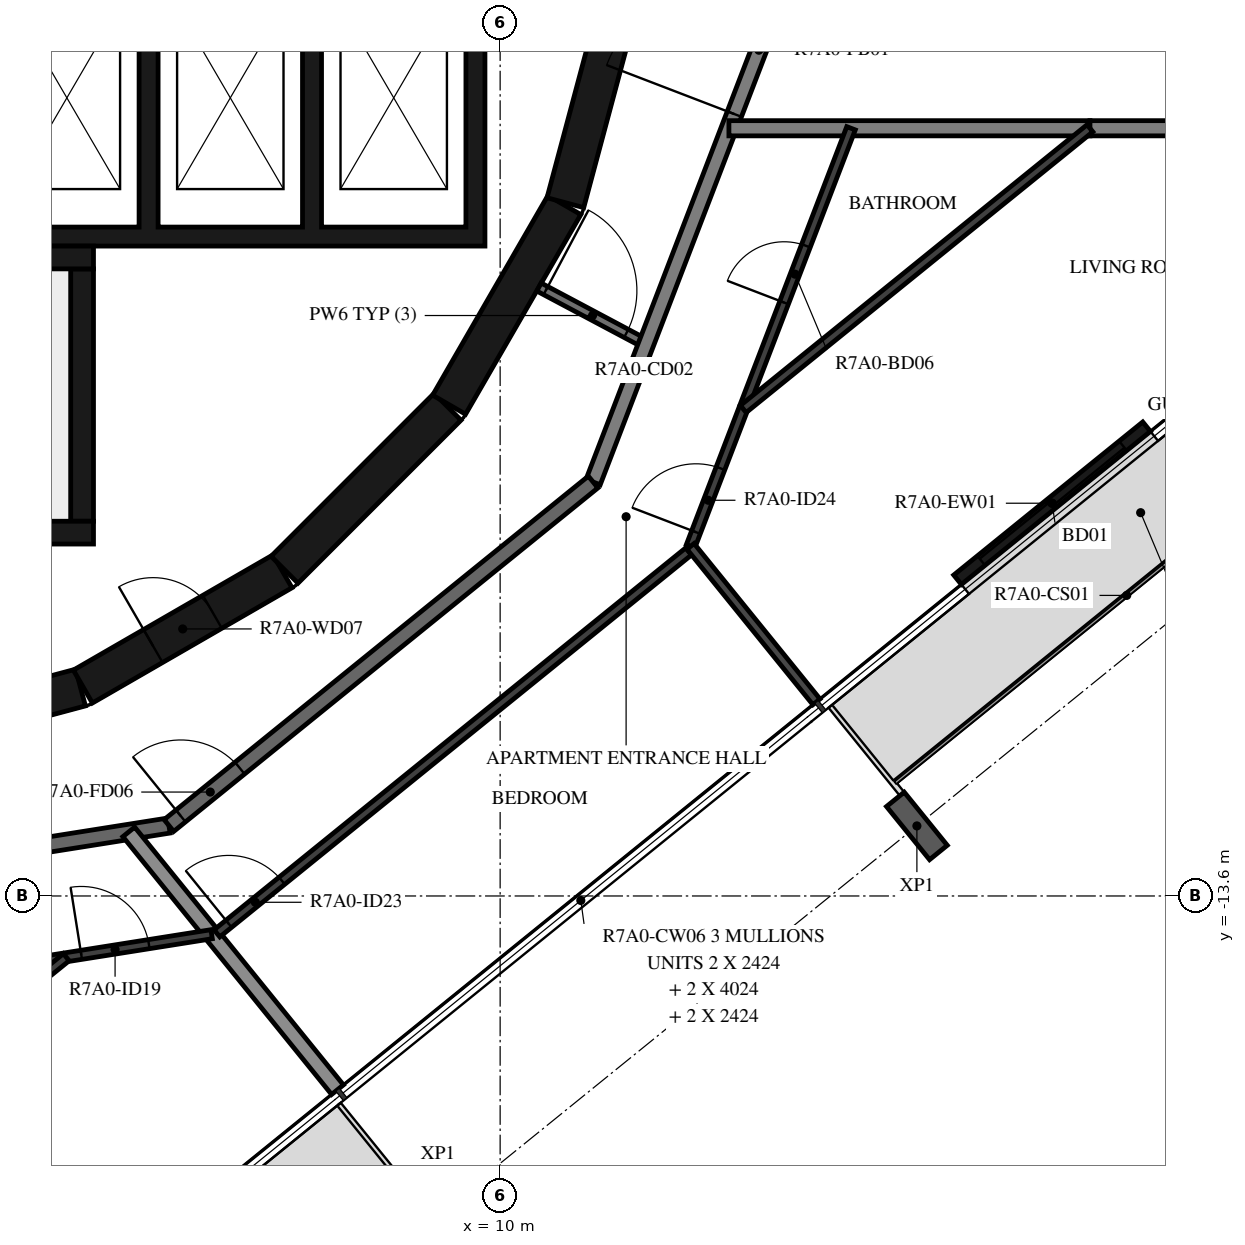
"""IFC4 building model, lengths in metres.
Left out: names, types, materials, properties, quantities, classifications, styles, units other than length and angle.
Written with IfcOpenShell. Run it as: python <this file> out.ifc"""

import sys

from ifc_helpers import new_model, si_unit, direction, frame, frame_2d, origin, origin_2d, place, context, subcontext, project, spatial, polyline, rectangle, i_section, outline, extrude, element, fill, save


model = new_model("IFC4")
c1 = context("Model", 3, precision=1e-05, world=origin(), true_north=direction((0.0, 1.0)))
c2 = subcontext(c1, "Body", "Model", "MODEL_VIEW")
j1 = project(units=[si_unit("LENGTHUNIT", "METRE"), si_unit("PLANEANGLEUNIT", "RADIAN")], contexts=[c1])
p1 = place(None, origin())
s1 = spatial("IfcSite", under=j1, at=p1, CompositionType="ELEMENT")
p2 = place(p1, origin())
s2 = spatial("IfcBuilding", under=s1, at=p2, CompositionType="ELEMENT")
p3 = place(p2, frame((0.0, 0.0, 270.4)))
s3 = spatial("IfcBuildingStorey", under=s2, at=p3, CompositionType="ELEMENT", Elevation=270.4)
p4 = place(p3, frame((15.483, -12.678, -0.38), z_axis=(0.0, 0.0, 1.0), x_axis=(-0.777146167973, -0.629320136024, 0.0)))
e1 = element("IfcColumn", 1, at=p4, inside=s3, PredefinedType="COLUMN", context=c2, shape_type="SweptSolid", body=[
    extrude(i_section(OverallWidth=0.3, OverallDepth=0.9, WebThickness=0.019, FlangeThickness=0.035, FilletRadius=0.03, at=origin_2d()), origin(), (0.0, 0.0, 1.0), 3.5),
])
p5 = place(p3, frame((16.018, -9.44, 0.0), z_axis=(0.0, 0.0, 1.0), x_axis=(0.777125818, 0.629345265333, 0.0)))
e2 = element("IfcWall", 2, at=p5, inside=s3, PredefinedType="STANDARD", context=c2, shape_type="SweptSolid", body=[
    extrude(rectangle(XDim=3.2, YDim=0.16, at=frame_2d((1.6, 0.0))), origin(), (0.0, 0.0, 1.0), 3.12),
])
p6 = place(p5, frame((0.4, 0.0, 0.0)))
e3 = element("IfcOpeningElement", 3, at=p6, cuts=e2, PredefinedType="OPENING", context=c2, shape_type="SweptSolid", body=[
    extrude(rectangle(XDim=2.4, YDim=2.4, at=frame_2d((1.2, 1.2))), frame((0.0, 0.09, 0.0), z_axis=(0.0, -1.0, 0.0), x_axis=(1.0, 0.0, 0.0)), (0.0, 0.0, 1.0), 0.18),
])
p7 = place(p3, frame((1.55, -11.643, 0.0), z_axis=(0.0, 0.0, 1.0), x_axis=(0.965948410781, 0.258734743916, 0.0)))
e4 = element("IfcWall", 4, at=p7, inside=s3, PredefinedType="SHEAR", context=c2, shape_type="SweptSolid", body=[
    extrude(rectangle(XDim=3.033, YDim=0.5, at=frame_2d((1.516, 0.0))), origin(), (0.0, 0.0, 1.0), 3.12),
])
p8 = place(p3, frame((4.51, -10.845, 0.0), z_axis=(0.0, 0.0, 1.0), x_axis=(0.865975092491, 0.500087131594, 0.0)))
e5 = element("IfcWall", 5, at=p8, inside=s3, PredefinedType="SHEAR", context=c2, shape_type="SweptSolid", body=[
    extrude(rectangle(XDim=3.033, YDim=0.5, at=frame_2d((1.516, 0.0))), origin(), (0.0, 0.0, 1.0), 3.12),
])
p9 = place(p8, frame((1.066, 0.0, 0.0)))
e6 = element("IfcOpeningElement", 6, at=p9, cuts=e5, PredefinedType="OPENING", context=c2, shape_type="SweptSolid", body=[
    extrude(rectangle(XDim=0.9, YDim=2.1, at=frame_2d((0.45, 1.05))), frame((0.0, 0.26, 0.0), z_axis=(0.0, -1.0, 0.0), x_axis=(1.0, 0.0, 0.0)), (0.0, 0.0, 1.0), 0.52),
])
p10 = place(p3, frame((7.164, -9.308, 0.0), z_axis=(0.0, 0.0, 1.0), x_axis=(0.707106781187, 0.707106781187, 0.0)))
e7 = element("IfcWall", 7, at=p10, inside=s3, PredefinedType="SHEAR", context=c2, shape_type="SweptSolid", body=[
    extrude(rectangle(XDim=3.032, YDim=0.5, at=frame_2d((1.516, 0.0))), origin(), (0.0, 0.0, 1.0), 3.12),
])
for number, where, z_axis, x_axis in (
    (8, (9.329, -7.137, 0.0), (0.0, 0.0, 1.0), (0.5, 0.866, 0.0)),
    (9, (10.858, -4.479, 0.0), (0.0, 0.0, 1.0), (0.259, 0.966, 0.0)),
):
    element("IfcWall", number, at=place(p3, frame(where, z_axis=z_axis, x_axis=x_axis)), inside=s3, PredefinedType="SHEAR", context=c2, shape_type="SweptSolid", body=[
        extrude(rectangle(XDim=3.033, YDim=0.5, at=frame_2d((1.516, 0.0))), origin(), (0.0, 0.0, 1.0), 3.12),
    ])
p11 = place(p3, frame((-2.4, -5.2, 0.0), z_axis=(0.0, 0.0, 1.0), x_axis=(1.0, 0.0, 0.0)))
e10 = element("IfcWall", 10, at=p11, inside=s3, PredefinedType="SHEAR", context=c2, shape_type="SweptSolid", body=[
    extrude(rectangle(XDim=7.05, YDim=0.3, at=frame_2d((3.525, 0.0))), origin(), (0.0, 0.0, 1.0), 3.12),
])
p12 = place(p3, frame((4.5, -8.67, 0.0), z_axis=(0.0, 0.0, 1.0), x_axis=(0.0, 1.0, 0.0)))
e11 = element("IfcWall", 11, at=p12, inside=s3, PredefinedType="SHEAR", context=c2, shape_type="SweptSolid", body=[
    extrude(rectangle(XDim=3.32, YDim=0.3, at=frame_2d((1.66, 0.0))), origin(), (0.0, 0.0, 1.0), 3.12),
])
p13 = place(p3, frame((0.1, -8.82, 0.0), z_axis=(0.0, 0.0, 1.0), x_axis=(1.0, 0.0, 0.0)))
e12 = element("IfcWall", 12, at=p13, inside=s3, PredefinedType="SHEAR", context=c2, shape_type="SweptSolid", body=[
    extrude(rectangle(XDim=4.55, YDim=0.3, at=frame_2d((2.275, 0.0))), origin(), (0.0, 0.0, 1.0), 3.12),
])
p14 = place(p3, origin())
e13 = element("IfcWall", 13, at=p14, inside=s3, PredefinedType="SHEAR", context=c2, shape_type="SweptSolid", body=[
    extrude(outline(polyline([(9.8, -5.05), (9.8, -4.8), (9.8, -1.9), (9.55, -1.9), (9.55, -4.8), (7.65, -4.8), (7.65, -1.9), (7.4, -1.9), (7.4, -4.8), (5.5, -4.8), (5.5, -1.9), (5.25, -1.9), (5.25, -4.8), (3.35, -4.8), (3.35, -1.9), (3.1, -1.9), (3.1, -4.8), (1.2, -4.8), (1.2, -1.9), (0.95, -1.9), (0.95, -4.8), (-0.95, -4.8), (-0.95, -1.9), (-1.2, -1.9), (-1.2, -4.8), (-3.1, -4.8), (-3.1, -1.9), (-3.35, -1.9), (-3.35, -4.8), (-5.25, -4.8), (-5.25, -1.9), (-5.5, -1.9), (-5.5, -4.8), (-7.4, -4.8), (-7.4, -1.9), (-7.65, -1.9), (-7.65, -4.8), (-9.55, -4.8), (-9.55, -1.9), (-9.8, -1.9), (-9.8, -4.8), (-9.8, -5.05), (9.8, -5.05)])), origin(), (0.0, 0.0, 1.0), 3.12),
])
p15 = place(p3, frame((10.511, -5.589, 0.0), z_axis=(0.0, 0.0, 1.0), x_axis=(0.882983002821, -0.469404960273, 0.0)))
e14 = element("IfcWall", 14, at=p15, inside=s3, PredefinedType="PARTITIONING", context=c2, shape_type="SweptSolid", body=[
    extrude(rectangle(XDim=1.596, YDim=0.12, at=frame_2d((0.798, 0.0))), origin(), (0.0, 0.0, 1.0), 3.12),
])
p16 = place(p15, frame((0.1, 0.0, 0.0)))
e15 = element("IfcOpeningElement", 15, at=p16, cuts=e14, PredefinedType="OPENING", context=c2, shape_type="SweptSolid", body=[
    extrude(rectangle(XDim=1.2, YDim=2.1, at=frame_2d((0.6, 1.05))), frame((0.0, 0.07, 0.0), z_axis=(0.0, -1.0, 0.0), x_axis=(1.0, 0.0, 0.0)), (0.0, 0.0, 1.0), 0.14),
])
p17 = place(p3, frame((11.223, -8.154, 0.0), z_axis=(0.0, 0.0, 1.0), x_axis=(0.358341090983, 0.93359073609, 0.0)))
e16 = element("IfcWall", 16, at=p17, inside=s3, PredefinedType="STANDARD", context=c2, shape_type="SweptSolid", body=[
    extrude(rectangle(XDim=7.181, YDim=0.2, at=frame_2d((3.59, 0.0))), origin(), (0.0, 0.0, 1.0), 3.12),
])
p18 = place(p17, frame((5.185, 0.0, 0.0)))
e17 = element("IfcOpeningElement", 17, at=p18, cuts=e16, PredefinedType="OPENING", context=c2, shape_type="SweptSolid", body=[
    extrude(rectangle(XDim=1.8, YDim=2.1, at=frame_2d((0.9, 1.05))), frame((0.0, 0.11, 0.0), z_axis=(0.0, -1.0, 0.0), x_axis=(1.0, 0.0, 0.0)), (0.0, 0.0, 1.0), 0.22),
])
p19 = place(p3, frame((-1.45, -13.797, 0.0), z_axis=(0.0, 0.0, 1.0), x_axis=(0.987690361611, 0.156421704315, 0.0)))
e18 = element("IfcWall", 18, at=p19, inside=s3, PredefinedType="STANDARD", context=c2, shape_type="SweptSolid", body=[
    extrude(rectangle(XDim=7.181, YDim=0.2, at=frame_2d((3.591, 0.0))), origin(), (0.0, 0.0, 1.0), 3.12),
])
p20 = place(p19, frame((0.2, 0.0, 0.0)))
e19 = element("IfcOpeningElement", 19, at=p20, cuts=e18, PredefinedType="OPENING", context=c2, shape_type="SweptSolid", body=[
    extrude(rectangle(XDim=1.0, YDim=2.1, at=frame_2d((0.5, 1.05))), frame((0.0, 0.11, 0.0), z_axis=(0.0, -1.0, 0.0), x_axis=(1.0, 0.0, 0.0)), (0.0, 0.0, 1.0), 0.22),
])
p21 = place(p3, frame((5.643, -12.673, 0.0), z_axis=(0.0, 0.0, 1.0), x_axis=(0.777160148113, 0.629302871585, 0.0)))
e20 = element("IfcWall", 20, at=p21, inside=s3, PredefinedType="STANDARD", context=c2, shape_type="SweptSolid", body=[
    extrude(rectangle(XDim=7.181, YDim=0.2, at=frame_2d((3.59, 0.0))), origin(), (0.0, 0.0, 1.0), 3.12),
])
p22 = place(p21, frame((0.2, 0.0, 0.0)))
e21 = element("IfcOpeningElement", 21, at=p22, cuts=e20, PredefinedType="OPENING", context=c2, shape_type="SweptSolid", body=[
    extrude(rectangle(XDim=1.0, YDim=2.1, at=frame_2d((0.5, 1.05))), frame((0.0, 0.11, 0.0), z_axis=(0.0, -1.0, 0.0), x_axis=(1.0, 0.0, 0.0)), (0.0, 0.0, 1.0), 0.22),
])
p23 = place(p3, frame((13.01, -3.5, 0.0), z_axis=(0.0, 0.0, 1.0), x_axis=(1.0, 0.0, 0.0)))
e22 = element("IfcWall", 22, at=p23, inside=s3, PredefinedType="STANDARD", context=c2, shape_type="SweptSolid", body=[
    extrude(rectangle(XDim=4.75, YDim=0.2, at=frame_2d((2.375, 0.0))), origin(), (0.0, 0.0, 1.0), 3.12),
])
p24 = place(p3, frame((17.76, -3.5, 0.0), z_axis=(0.0, 0.0, 1.0), x_axis=(1.0, 0.0, 0.0)))
e23 = element("IfcWall", 23, at=p24, inside=s3, PredefinedType="STANDARD", context=c2, shape_type="SweptSolid", body=[
    extrude(rectangle(XDim=1.64, YDim=0.2, at=frame_2d((0.82, 0.0))), origin(), (0.0, 0.0, 1.0), 3.12),
])
p25 = place(p3, frame((7.861, -16.148, 0.0), z_axis=(0.0, 0.0, 1.0), x_axis=(-0.629330189513, 0.777138026716, 0.0)))
e24 = element("IfcWall", 24, at=p25, inside=s3, PredefinedType="STANDARD", context=c2, shape_type="SweptSolid", body=[
    extrude(rectangle(XDim=4.364, YDim=0.2, at=frame_2d((2.182, 0.0))), origin(), (0.0, 0.0, 1.0), 2.73),
])
p26 = place(p3, frame((-1.318, -15.294, 0.0), z_axis=(0.0, 0.0, 1.0), x_axis=(0.987689040792, 0.156430044108, 0.0)))
e25 = element("IfcWall", 25, at=p26, inside=s3, PredefinedType="PARTITIONING", context=c2, shape_type="SweptSolid", body=[
    extrude(rectangle(XDim=7.616, YDim=0.12, at=frame_2d((3.808, 0.0))), origin(), (0.0, 0.0, 1.0), 3.12),
])
p27 = place(p26, frame((0.4, 0.0, 0.0)))
e26 = element("IfcOpeningElement", 26, at=p27, cuts=e25, PredefinedType="OPENING", context=c2, shape_type="SweptSolid", body=[
    extrude(rectangle(XDim=0.8, YDim=2.1, at=frame_2d((0.4, 1.05))), frame((0.0, 0.07, 0.0), z_axis=(0.0, -1.0, 0.0), x_axis=(1.0, 0.0, 0.0)), (0.0, 0.0, 1.0), 0.14),
])
p28 = place(p26, frame((5.88, 0.0, 0.0)))
e27 = element("IfcOpeningElement", 27, at=p28, cuts=e25, PredefinedType="OPENING", context=c2, shape_type="SweptSolid", body=[
    extrude(rectangle(XDim=0.9, YDim=2.1, at=frame_2d((0.45, 1.05))), frame((0.0, 0.07, 0.0), z_axis=(0.0, -1.0, 0.0), x_axis=(1.0, 0.0, 0.0)), (0.0, 0.0, 1.0), 0.14),
])
p29 = place(p3, frame((-3.875, -21.019, 0.0), z_axis=(0.0, 0.0, 1.0), x_axis=(0.777149096542, 0.629316519523, 0.0)))
e28 = element("IfcWall", 28, at=p29, inside=s3, PredefinedType="PARTITIONING", context=c2, shape_type="SweptSolid", body=[
    extrude(rectangle(XDim=10.508, YDim=0.12, at=frame_2d((5.254, 0.0))), origin(), (0.0, 0.0, 1.0), 3.12),
])
p30 = place(p29, frame((1.23, 0.0, 0.0)))
e29 = element("IfcOpeningElement", 29, at=p30, cuts=e28, PredefinedType="OPENING", context=c2, shape_type="SweptSolid", body=[
    extrude(rectangle(XDim=0.9, YDim=2.1, at=frame_2d((0.45, 1.05))), frame((0.0, 0.07, 0.0), z_axis=(0.0, -1.0, 0.0), x_axis=(1.0, 0.0, 0.0)), (0.0, 0.0, 1.0), 0.14),
])
p31 = place(p3, frame((6.274, -14.092, 0.0), z_axis=(0.0, 0.0, 1.0), x_axis=(0.777135206268, 0.62933367237, 0.0)))
e30 = element("IfcWall", 30, at=p31, inside=s3, PredefinedType="PARTITIONING", context=c2, shape_type="SweptSolid", body=[
    extrude(rectangle(XDim=7.985, YDim=0.12, at=frame_2d((3.992, 0.0))), origin(), (0.0, 0.0, 1.0), 3.12),
])
p32 = place(p31, frame((0.2, 0.0, 0.0)))
e31 = element("IfcOpeningElement", 31, at=p32, cuts=e30, PredefinedType="OPENING", context=c2, shape_type="SweptSolid", body=[
    extrude(rectangle(XDim=0.9, YDim=2.1, at=frame_2d((0.45, 1.05))), frame((0.0, 0.07, 0.0), z_axis=(0.0, -1.0, 0.0), x_axis=(1.0, 0.0, 0.0)), (0.0, 0.0, 1.0), 0.14),
])
p33 = place(p3, frame((12.505, -9.001, 0.0), z_axis=(0.0, 0.0, 1.0), x_axis=(0.358373707046, 0.933578216379, 0.0)))
e32 = element("IfcWall", 32, at=p33, inside=s3, PredefinedType="PARTITIONING", context=c2, shape_type="SweptSolid", body=[
    extrude(rectangle(XDim=5.892, YDim=0.12, at=frame_2d((2.946, 0.0))), origin(), (0.0, 0.0, 1.0), 3.12),
])
p34 = place(p33, frame((0.2, 0.0, 0.0)))
e33 = element("IfcOpeningElement", 33, at=p34, cuts=e32, PredefinedType="OPENING", context=c2, shape_type="SweptSolid", body=[
    extrude(rectangle(XDim=0.9, YDim=2.1, at=frame_2d((0.45, 1.05))), frame((0.0, 0.07, 0.0), z_axis=(0.0, -1.0, 0.0), x_axis=(1.0, 0.0, 0.0)), (0.0, 0.0, 1.0), 0.14),
])
p35 = place(p33, frame((3.436, 0.0, 0.0)))
e34 = element("IfcOpeningElement", 34, at=p35, cuts=e32, PredefinedType="OPENING", context=c2, shape_type="SweptSolid", body=[
    extrude(rectangle(XDim=0.8, YDim=2.1, at=frame_2d((0.4, 1.05))), frame((0.0, 0.07, 0.0), z_axis=(0.0, -1.0, 0.0), x_axis=(1.0, 0.0, 0.0)), (0.0, 0.0, 1.0), 0.14),
])
p36 = place(p3, frame((14.161, -11.046, 0.0), z_axis=(0.0, 0.0, 1.0), x_axis=(-0.62931028473, 0.777154145284, 0.0)))
e35 = element("IfcWall", 35, at=p36, inside=s3, PredefinedType="PARTITIONING", context=c2, shape_type="SweptSolid", body=[
    extrude(rectangle(XDim=2.632, YDim=0.12, at=frame_2d((1.316, 0.0))), origin(), (0.0, 0.0, 1.0), 2.73),
])
p37 = place(p3, frame((17.76, -3.5, 0.0), z_axis=(0.0, 0.0, 1.0), x_axis=(-0.777133455716, -0.62933583404, 0.0)))
e36 = element("IfcWall", 36, at=p37, inside=s3, PredefinedType="PARTITIONING", context=c2, shape_type="SweptSolid", body=[
    extrude(rectangle(XDim=5.869, YDim=0.12, at=frame_2d((2.935, 0.0))), origin(), (0.0, 0.0, 1.0), 3.12),
])
p38 = place(p6, origin())
e37 = element("IfcDoor", 37, at=p38, inside=s3, OperationType="DOUBLE_DOOR_SLIDING", PredefinedType="DOOR", context=c2, shape_type="SweptSolid", body=[
    extrude(rectangle(XDim=2.4, YDim=2.4, at=frame_2d((1.2, 1.2))), frame((0.0, 0.025, 0.0), z_axis=(0.0, -1.0, 0.0), x_axis=(1.0, 0.0, 0.0)), (0.0, 0.0, 1.0), 0.05),
])
fill(e3, e37)
p39 = place(p9, origin())
e38 = element("IfcDoor", 38, at=p39, inside=s3, OperationType="SINGLE_SWING_LEFT", PredefinedType="DOOR", context=c2, shape_type="SweptSolid", body=[
    extrude(rectangle(XDim=0.9, YDim=2.1, at=frame_2d((0.45, 1.05))), frame((0.0, 0.025, 0.0), z_axis=(0.0, -1.0, 0.0), x_axis=(1.0, 0.0, 0.0)), (0.0, 0.0, 1.0), 0.05),
])
fill(e6, e38)
p40 = place(p28, origin())
e39 = element("IfcDoor", 39, at=p40, inside=s3, OperationType="SINGLE_SWING_LEFT", PredefinedType="DOOR", context=c2, shape_type="SweptSolid", body=[
    extrude(rectangle(XDim=0.9, YDim=2.1, at=frame_2d((0.45, 1.05))), frame((0.0, 0.025, 0.0), z_axis=(0.0, -1.0, 0.0), x_axis=(1.0, 0.0, 0.0)), (0.0, 0.0, 1.0), 0.05),
])
fill(e27, e39)
p41 = place(p22, origin())
e40 = element("IfcDoor", 40, at=p41, inside=s3, OperationType="SINGLE_SWING_LEFT", PredefinedType="DOOR", context=c2, shape_type="SweptSolid", body=[
    extrude(rectangle(XDim=1.0, YDim=2.1, at=frame_2d((0.5, 1.05))), frame((0.0, 0.025, 0.0), z_axis=(0.0, -1.0, 0.0), x_axis=(1.0, 0.0, 0.0)), (0.0, 0.0, 1.0), 0.05),
])
fill(e21, e40)
p42 = place(p32, origin())
e41 = element("IfcDoor", 41, at=p42, inside=s3, OperationType="SINGLE_SWING_LEFT", PredefinedType="DOOR", context=c2, shape_type="SweptSolid", body=[
    extrude(rectangle(XDim=0.9, YDim=2.1, at=frame_2d((0.45, 1.05))), frame((0.0, 0.025, 0.0), z_axis=(0.0, -1.0, 0.0), x_axis=(1.0, 0.0, 0.0)), (0.0, 0.0, 1.0), 0.05),
])
fill(e31, e41)
p43 = place(p34, origin())
e42 = element("IfcDoor", 42, at=p43, inside=s3, OperationType="SINGLE_SWING_RIGHT", PredefinedType="DOOR", context=c2, shape_type="SweptSolid", body=[
    extrude(rectangle(XDim=0.9, YDim=2.1, at=frame_2d((0.45, 1.05))), frame((0.0, 0.025, 0.0), z_axis=(0.0, -1.0, 0.0), x_axis=(1.0, 0.0, 0.0)), (0.0, 0.0, 1.0), 0.05),
])
fill(e33, e42)
p44 = place(p35, origin())
e43 = element("IfcDoor", 43, at=p44, inside=s3, OperationType="SINGLE_SWING_RIGHT", PredefinedType="DOOR", context=c2, shape_type="SweptSolid", body=[
    extrude(rectangle(XDim=0.8, YDim=2.1, at=frame_2d((0.4, 1.05))), frame((0.0, 0.025, 0.0), z_axis=(0.0, -1.0, 0.0), x_axis=(1.0, 0.0, 0.0)), (0.0, 0.0, 1.0), 0.05),
])
fill(e34, e43)
p45 = place(p16, origin())
e44 = element("IfcDoor", 44, at=p45, inside=s3, OperationType="DOUBLE_DOOR_SINGLE_SWING", PredefinedType="DOOR", context=c2, shape_type="SweptSolid", body=[
    extrude(rectangle(XDim=1.2, YDim=2.1, at=frame_2d((0.6, 1.05))), frame((0.0, 0.025, 0.0), z_axis=(0.0, -1.0, 0.0), x_axis=(1.0, 0.0, 0.0)), (0.0, 0.0, 1.0), 0.05),
])
fill(e15, e44)
p46 = place(p18, origin())
e45 = element("IfcDoor", 45, at=p46, inside=s3, OperationType="DOUBLE_DOOR_SINGLE_SWING", PredefinedType="DOOR", context=c2, shape_type="SweptSolid", body=[
    extrude(rectangle(XDim=1.8, YDim=2.1, at=frame_2d((0.9, 1.05))), frame((0.0, 0.025, 0.0), z_axis=(0.0, -1.0, 0.0), x_axis=(1.0, 0.0, 0.0)), (0.0, 0.0, 1.0), 0.05),
])
fill(e17, e45)
save(model, sys.argv[1])
